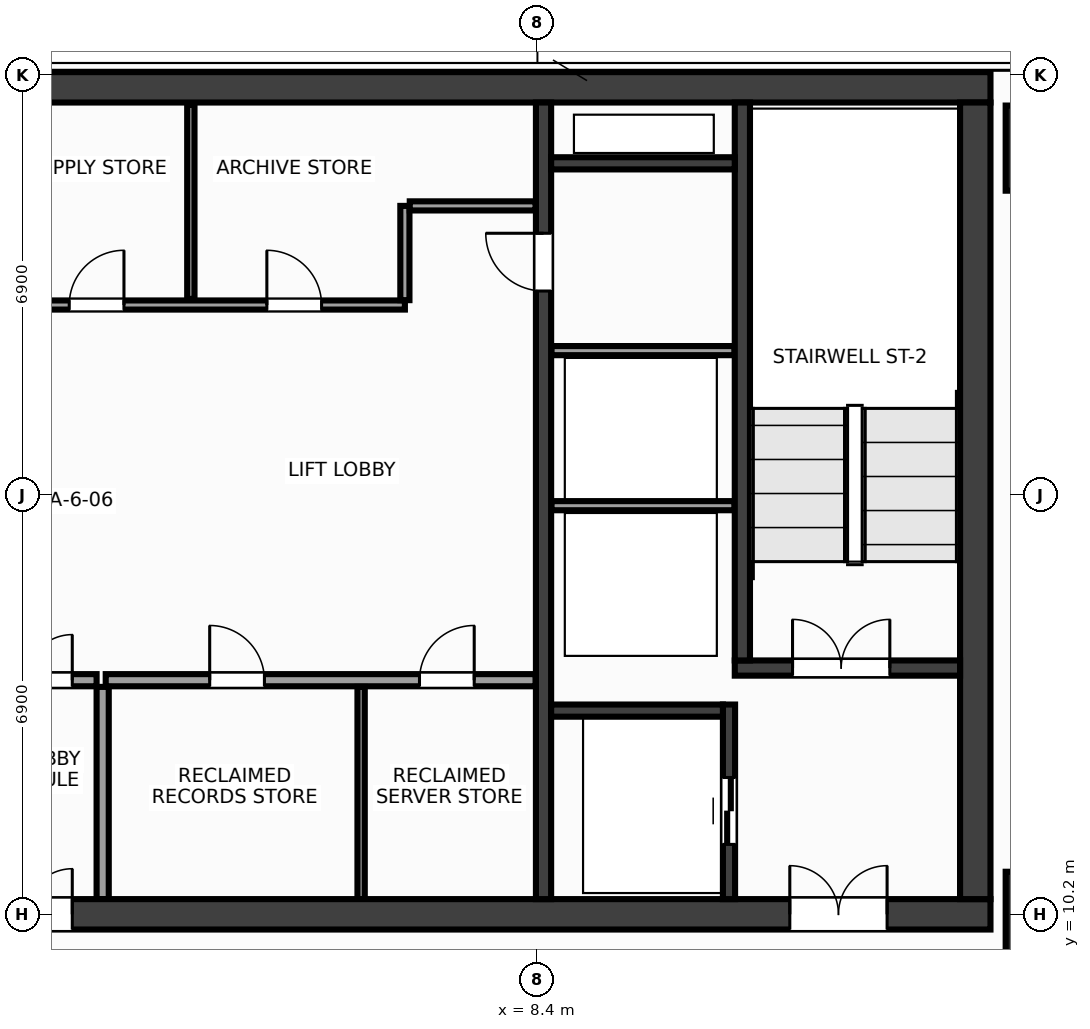
"""IFC4 building model, lengths in metres.
Left out: names, types, materials, properties, quantities, classifications, styles, units other than length and angle.
Written with IfcOpenShell. Run it as: python <this file> out.ifc"""

import sys

from ifc_helpers import new_model, si_unit, direction, frame, frame_2d, origin, origin_2d, place, context, subcontext, project, spatial, rectangle, extrude, source, transform, mapped, element, fill, save


model = new_model("IFC4")
c1 = context("Model", 3, precision=1e-05, world=origin(), true_north=direction((0.0, 1.0)))
c2 = subcontext(c1, "Body", "Model", "MODEL_VIEW")
j1 = project(units=[si_unit("LENGTHUNIT", "METRE"), si_unit("PLANEANGLEUNIT", "RADIAN")], contexts=[c1])
p1 = place(None, origin())
s1 = spatial("IfcSite", under=j1, at=p1, CompositionType="ELEMENT")
p2 = place(p1, origin())
s2 = spatial("IfcBuilding", under=s1, at=p2, CompositionType="ELEMENT")
p3 = place(p2, frame((0.0, 0.0, 257.6)))
s3 = spatial("IfcBuildingStorey", under=s2, at=p3, CompositionType="ELEMENT", Elevation=257.6)
m1 = source(origin(), c2, "Body", "SweptSolid", [
    extrude(rectangle(XDim=31.7, YDim=0.5, at=frame_2d((15.85, 0.0))), origin(), (0.0, 0.0, 1.0), 3.6),
])
p4 = place(p3, frame((-15.85, 23.8, 0.0), z_axis=(0.0, 0.0, 1.0), x_axis=(1.0, 0.0, 0.0)))
e1 = element("IfcWall", 1, at=p4, inside=s3, PredefinedType="SHEAR", context=c2, shape_type="MappedRepresentation", body=[
    mapped(m1, transform((0.0, 0.0, 0.0), x_axis=(1.0, 0.0, 0.0), y_axis=(0.0, 1.0, 0.0), z_axis=(0.0, 0.0, 1.0), scale=1.0)),
])
p5 = place(p3, frame((-15.85, 10.2, 0.0), z_axis=(0.0, 0.0, 1.0), x_axis=(1.0, 0.0, 0.0)))
e2 = element("IfcWall", 2, at=p5, inside=s3, PredefinedType="SHEAR", context=c2, shape_type="MappedRepresentation", body=[
    mapped(m1, transform((0.0, 0.0, 0.0), x_axis=(1.0, 0.0, 0.0), y_axis=(0.0, 1.0, 0.0), z_axis=(0.0, 0.0, 1.0), scale=1.0)),
])
p6 = place(p5, frame((1.7, 0.0, 0.0)))
e3 = element("IfcOpeningElement", 3, at=p6, cuts=e2, PredefinedType="OPENING", context=c2, shape_type="SweptSolid", body=[
    extrude(rectangle(XDim=1.6, YDim=2.15, at=frame_2d((0.8, 1.075))), frame((0.0, 0.262, 0.0), z_axis=(0.0, -1.0, 0.0), x_axis=(1.0, 0.0, 0.0)), (0.0, 0.0, 1.0), 0.524),
])
p7 = place(p5, frame((28.4, 0.0, 0.0)))
e4 = element("IfcOpeningElement", 4, at=p7, cuts=e2, PredefinedType="OPENING", context=c2, shape_type="SweptSolid", body=[
    extrude(rectangle(XDim=1.6, YDim=2.15, at=frame_2d((0.8, 1.075))), frame((0.0, 0.262, 0.0), z_axis=(0.0, -1.0, 0.0), x_axis=(1.0, 0.0, 0.0)), (0.0, 0.0, 1.0), 0.524),
])
p8 = place(p5, frame((15.1, 0.0, 0.0)))
e5 = element("IfcOpeningElement", 5, at=p8, cuts=e2, PredefinedType="OPENING", context=c2, shape_type="SweptSolid", body=[
    extrude(rectangle(XDim=1.5, YDim=2.2, at=frame_2d((0.75, 1.1))), frame((0.0, 0.262, 0.0), z_axis=(0.0, -1.0, 0.0), x_axis=(1.0, 0.0, 0.0)), (0.0, 0.0, 1.0), 0.524),
])
m2 = source(origin(), c2, "Body", "SweptSolid", [
    extrude(rectangle(XDim=13.1, YDim=0.5, at=frame_2d((6.55, 0.0))), origin(), (0.0, 0.0, 1.0), 3.6),
])
p9 = place(p3, frame((15.6, 10.45, 0.0), z_axis=(0.0, 0.0, 1.0), x_axis=(0.0, 1.0, 0.0)))
e6 = element("IfcWall", 6, at=p9, inside=s3, PredefinedType="SHEAR", context=c2, shape_type="MappedRepresentation", body=[
    mapped(m2, transform((0.0, 0.0, 0.0), x_axis=(1.0, 0.0, 0.0), y_axis=(0.0, 1.0, 0.0), z_axis=(0.0, 0.0, 1.0), scale=1.0)),
])
m3 = source(origin(), c2, "Body", "SweptSolid", [
    extrude(rectangle(XDim=13.1, YDim=0.25, at=frame_2d((6.55, 0.0))), origin(), (0.0, 0.0, 1.0), 3.6),
])
p10 = place(p3, frame((8.5, 10.45, 0.0), z_axis=(0.0, 0.0, 1.0), x_axis=(0.0, 1.0, 0.0)))
e7 = element("IfcWall", 7, at=p10, inside=s3, PredefinedType="SHEAR", context=c2, shape_type="MappedRepresentation", body=[
    mapped(m3, transform((0.0, 0.0, 0.0), x_axis=(1.0, 0.0, 0.0), y_axis=(0.0, 1.0, 0.0), z_axis=(0.0, 0.0, 1.0), scale=1.0)),
])
p11 = place(p10, frame((10.0, 0.0, 0.0)))
e8 = element("IfcOpeningElement", 8, at=p11, cuts=e7, PredefinedType="OPENING", context=c2, shape_type="SweptSolid", body=[
    extrude(rectangle(XDim=0.95, YDim=2.15, at=frame_2d((0.475, 1.075))), frame((0.0, 0.137, 0.0), z_axis=(0.0, -1.0, 0.0), x_axis=(1.0, 0.0, 0.0)), (0.0, 0.0, 1.0), 0.274),
])
m4 = source(origin(), c2, "Body", "SweptSolid", [
    extrude(rectangle(XDim=3.705, YDim=0.25, at=frame_2d((1.853, 0.0))), origin(), (0.0, 0.0, 1.0), 3.6),
])
p12 = place(p3, frame((11.645, 14.25, 0.0), z_axis=(0.0, 0.0, 1.0), x_axis=(1.0, 0.0, 0.0)))
e9 = element("IfcWall", 9, at=p12, inside=s3, PredefinedType="SHEAR", context=c2, shape_type="MappedRepresentation", body=[
    mapped(m4, transform((0.0, 0.0, 0.0), x_axis=(1.0, 0.0, 0.0), y_axis=(0.0, 1.0, 0.0), z_axis=(0.0, 0.0, 1.0), scale=1.0)),
])
p13 = place(p12, frame((0.95, 0.0, 0.0)))
e10 = element("IfcOpeningElement", 10, at=p13, cuts=e9, PredefinedType="OPENING", context=c2, shape_type="SweptSolid", body=[
    extrude(rectangle(XDim=1.6, YDim=2.15, at=frame_2d((0.8, 1.075))), frame((0.0, 0.137, 0.0), z_axis=(0.0, -1.0, 0.0), x_axis=(1.0, 0.0, 0.0)), (0.0, 0.0, 1.0), 0.274),
])
m5 = source(origin(), c2, "Body", "SweptSolid", [
    extrude(rectangle(XDim=9.175, YDim=0.25, at=frame_2d((4.587, 0.0))), origin(), (0.0, 0.0, 1.0), 3.6),
])
p14 = place(p3, frame((11.77, 14.375, 0.0), z_axis=(0.0, 0.0, 1.0), x_axis=(0.0, 1.0, 0.0)))
e11 = element("IfcWall", 11, at=p14, inside=s3, PredefinedType="SHEAR", context=c2, shape_type="MappedRepresentation", body=[
    mapped(m5, transform((0.0, 0.0, 0.0), x_axis=(1.0, 0.0, 0.0), y_axis=(0.0, 1.0, 0.0), z_axis=(0.0, 0.0, 1.0), scale=1.0)),
])
m6 = source(origin(), c2, "Body", "SweptSolid", [
    extrude(rectangle(XDim=3.2, YDim=0.2, at=frame_2d((1.6, 0.0))), origin(), (0.0, 0.0, 1.0), 3.6),
])
p15 = place(p3, frame((11.55, 10.45, 0.0), z_axis=(0.0, 0.0, 1.0), x_axis=(0.0, 1.0, 0.0)))
e12 = element("IfcWall", 12, at=p15, inside=s3, PredefinedType="SHEAR", context=c2, shape_type="MappedRepresentation", body=[
    mapped(m6, transform((0.0, 0.0, 0.0), x_axis=(1.0, 0.0, 0.0), y_axis=(0.0, 1.0, 0.0), z_axis=(0.0, 0.0, 1.0), scale=1.0)),
])
p16 = place(p15, frame((0.9, 0.0, 0.0)))
e13 = element("IfcOpeningElement", 13, at=p16, cuts=e12, PredefinedType="OPENING", context=c2, shape_type="SweptSolid", body=[
    extrude(rectangle(XDim=1.1, YDim=2.15, at=frame_2d((0.55, 1.075))), frame((0.0, 0.112, 0.0), z_axis=(0.0, -1.0, 0.0), x_axis=(1.0, 0.0, 0.0)), (0.0, 0.0, 1.0), 0.224),
])
m7 = source(origin(), c2, "Body", "SweptSolid", [
    extrude(rectangle(XDim=2.825, YDim=0.2, at=frame_2d((1.413, 0.0))), origin(), (0.0, 0.0, 1.0), 3.6),
])
p17 = place(p3, frame((8.625, 13.55, 0.0), z_axis=(0.0, 0.0, 1.0), x_axis=(1.0, 0.0, 0.0)))
e14 = element("IfcWall", 14, at=p17, inside=s3, PredefinedType="SHEAR", context=c2, shape_type="MappedRepresentation", body=[
    mapped(m7, transform((0.0, 0.0, 0.0), x_axis=(1.0, 0.0, 0.0), y_axis=(0.0, 1.0, 0.0), z_axis=(0.0, 0.0, 1.0), scale=1.0)),
])
m8 = source(origin(), c2, "Body", "SweptSolid", [
    extrude(rectangle(XDim=3.02, YDim=0.2, at=frame_2d((1.51, 0.0))), origin(), (0.0, 0.0, 1.0), 3.6),
])
p18 = place(p3, frame((8.625, 22.55, 0.0), z_axis=(0.0, 0.0, 1.0), x_axis=(1.0, 0.0, 0.0)))
e15 = element("IfcWall", 15, at=p18, inside=s3, PredefinedType="SHEAR", context=c2, shape_type="MappedRepresentation", body=[
    mapped(m8, transform((0.0, 0.0, 0.0), x_axis=(1.0, 0.0, 0.0), y_axis=(0.0, 1.0, 0.0), z_axis=(0.0, 0.0, 1.0), scale=1.0)),
])
m9 = source(origin(), c2, "Body", "SweptSolid", [
    extrude(rectangle(XDim=1.4, YDim=1.4, at=origin_2d()), origin(), (0.0, 0.0, 1.0), 3.6),
])
for number, where, z_axis, x_axis in (
    (16, (16.8, 10.2, 0.0), (0.0, 0.0, 1.0), (1.0, 0.0, 0.0)),
    (17, (16.8, 22.8, 0.0), (0.0, 0.0, 1.0), (1.0, 0.0, 0.0)),
):
    element("IfcColumn", number, at=place(p3, frame(where, z_axis=z_axis, x_axis=x_axis)), inside=s3, PredefinedType="COLUMN", context=c2, shape_type="MappedRepresentation", body=[
        mapped(m9, transform((0.0, 0.0, 0.0), x_axis=(1.0, 0.0, 0.0), y_axis=(0.0, 1.0, 0.0), z_axis=(0.0, 0.0, 1.0), scale=1.0)),
    ])
m10 = source(origin(), c2, "Body", "SweptSolid", [
    extrude(rectangle(XDim=3.01, YDim=0.15, at=frame_2d((1.505, 0.0))), origin(), (0.0, 0.0, 1.0), 3.37),
])
for number, where, z_axis, x_axis in (
    (18, (8.63, 16.92, 0.0), (0.0, 0.0, 1.0), (1.0, 0.0, 0.0)),
    (19, (8.63, 19.47, 0.0), (0.0, 0.0, 1.0), (1.0, 0.0, 0.0)),
):
    element("IfcWall", number, at=place(p3, frame(where, z_axis=z_axis, x_axis=x_axis)), inside=s3, PredefinedType="PARTITIONING", context=c2, shape_type="MappedRepresentation", body=[
        mapped(m10, transform((0.0, 0.0, 0.0), x_axis=(1.0, 0.0, 0.0), y_axis=(0.0, 1.0, 0.0), z_axis=(0.0, 0.0, 1.0), scale=1.0)),
    ])
m11 = source(origin(), c2, "Body", "SweptSolid", [
    extrude(rectangle(XDim=7.07, YDim=0.2, at=frame_2d((3.535, 0.0))), origin(), (0.0, 0.0, 1.0), 3.37),
])
p19 = place(p3, frame((1.3, 14.05, 0.0), z_axis=(0.0, 0.0, 1.0), x_axis=(1.0, 0.0, 0.0)))
e20 = element("IfcWall", 20, at=p19, inside=s3, PredefinedType="PARTITIONING", context=c2, shape_type="MappedRepresentation", body=[
    mapped(m11, transform((0.0, 0.0, 0.0), x_axis=(1.0, 0.0, 0.0), y_axis=(0.0, 1.0, 0.0), z_axis=(0.0, 0.0, 1.0), scale=1.0)),
])
p20 = place(p19, frame((1.71, 0.0, 0.0)))
e21 = element("IfcOpeningElement", 21, at=p20, cuts=e20, PredefinedType="OPENING", context=c2, shape_type="SweptSolid", body=[
    extrude(rectangle(XDim=0.9, YDim=2.15, at=frame_2d((0.45, 1.075))), frame((0.0, 0.112, 0.0), z_axis=(0.0, -1.0, 0.0), x_axis=(1.0, 0.0, 0.0)), (0.0, 0.0, 1.0), 0.224),
])
p21 = place(p19, frame((5.16, 0.0, 0.0)))
e22 = element("IfcOpeningElement", 22, at=p21, cuts=e20, PredefinedType="OPENING", context=c2, shape_type="SweptSolid", body=[
    extrude(rectangle(XDim=0.9, YDim=2.15, at=frame_2d((0.45, 1.075))), frame((0.0, 0.112, 0.0), z_axis=(0.0, -1.0, 0.0), x_axis=(1.0, 0.0, 0.0)), (0.0, 0.0, 1.0), 0.224),
])
m12 = source(origin(), c2, "Body", "SweptSolid", [
    extrude(rectangle(XDim=3.49, YDim=0.2, at=frame_2d((1.745, 0.0))), origin(), (0.0, 0.0, 1.0), 3.37),
])
p22 = place(p3, frame((1.25, 10.45, 0.0), z_axis=(0.0, 0.0, 1.0), x_axis=(0.0, 1.0, 0.0)))
e23 = element("IfcWall", 23, at=p22, inside=s3, PredefinedType="PARTITIONING", context=c2, shape_type="MappedRepresentation", body=[
    mapped(m12, transform((0.0, 0.0, 0.0), x_axis=(1.0, 0.0, 0.0), y_axis=(0.0, 1.0, 0.0), z_axis=(0.0, 0.0, 1.0), scale=1.0)),
])
m13 = source(origin(), c2, "Body", "SweptSolid", [
    extrude(rectangle(XDim=2.3, YDim=0.2, at=frame_2d((1.15, 0.0))), origin(), (0.0, 0.0, 1.0), 3.37),
])
p23 = place(p3, frame((-1.15, 14.05, 0.0), z_axis=(0.0, 0.0, 1.0), x_axis=(1.0, 0.0, 0.0)))
e24 = element("IfcWall", 24, at=p23, inside=s3, PredefinedType="PARTITIONING", context=c2, shape_type="MappedRepresentation", body=[
    mapped(m13, transform((0.0, 0.0, 0.0), x_axis=(1.0, 0.0, 0.0), y_axis=(0.0, 1.0, 0.0), z_axis=(0.0, 0.0, 1.0), scale=1.0)),
])
p24 = place(p23, frame((0.4, 0.0, 0.0)))
e25 = element("IfcOpeningElement", 25, at=p24, cuts=e24, PredefinedType="OPENING", context=c2, shape_type="SweptSolid", body=[
    extrude(rectangle(XDim=1.5, YDim=2.2, at=frame_2d((0.75, 1.1))), frame((0.0, 0.112, 0.0), z_axis=(0.0, -1.0, 0.0), x_axis=(1.0, 0.0, 0.0)), (0.0, 0.0, 1.0), 0.224),
])
m14 = source(origin(), c2, "Body", "SweptSolid", [
    extrude(rectangle(XDim=14.59, YDim=0.15, at=frame_2d((7.295, 0.0))), origin(), (0.0, 0.0, 1.0), 3.37),
])
p25 = place(p3, frame((-8.37, 20.22, 0.0), z_axis=(0.0, 0.0, 1.0), x_axis=(1.0, 0.0, 0.0)))
e26 = element("IfcWall", 26, at=p25, inside=s3, PredefinedType="PARTITIONING", context=c2, shape_type="MappedRepresentation", body=[
    mapped(m14, transform((0.0, 0.0, 0.0), x_axis=(1.0, 0.0, 0.0), y_axis=(0.0, 1.0, 0.0), z_axis=(0.0, 0.0, 1.0), scale=1.0)),
])
p26 = place(p25, frame((0.86, 0.0, 0.0)))
e27 = element("IfcOpeningElement", 27, at=p26, cuts=e26, PredefinedType="OPENING", context=c2, shape_type="SweptSolid", body=[
    extrude(rectangle(XDim=0.9, YDim=2.15, at=frame_2d((0.45, 1.075))), frame((0.0, 0.087, 0.0), z_axis=(0.0, -1.0, 0.0), x_axis=(1.0, 0.0, 0.0)), (0.0, 0.0, 1.0), 0.174),
])
p27 = place(p25, frame((3.47, 0.0, 0.0)))
e28 = element("IfcOpeningElement", 28, at=p27, cuts=e26, PredefinedType="OPENING", context=c2, shape_type="SweptSolid", body=[
    extrude(rectangle(XDim=0.9, YDim=2.15, at=frame_2d((0.45, 1.075))), frame((0.0, 0.087, 0.0), z_axis=(0.0, -1.0, 0.0), x_axis=(1.0, 0.0, 0.0)), (0.0, 0.0, 1.0), 0.174),
])
p28 = place(p25, frame((6.17, 0.0, 0.0)))
e29 = element("IfcOpeningElement", 29, at=p28, cuts=e26, PredefinedType="OPENING", context=c2, shape_type="SweptSolid", body=[
    extrude(rectangle(XDim=0.9, YDim=2.15, at=frame_2d((0.45, 1.075))), frame((0.0, 0.087, 0.0), z_axis=(0.0, -1.0, 0.0), x_axis=(1.0, 0.0, 0.0)), (0.0, 0.0, 1.0), 0.174),
])
p29 = place(p25, frame((9.07, 0.0, 0.0)))
e30 = element("IfcOpeningElement", 30, at=p29, cuts=e26, PredefinedType="OPENING", context=c2, shape_type="SweptSolid", body=[
    extrude(rectangle(XDim=0.9, YDim=2.15, at=frame_2d((0.45, 1.075))), frame((0.0, 0.087, 0.0), z_axis=(0.0, -1.0, 0.0), x_axis=(1.0, 0.0, 0.0)), (0.0, 0.0, 1.0), 0.174),
])
p30 = place(p25, frame((12.32, 0.0, 0.0)))
e31 = element("IfcOpeningElement", 31, at=p30, cuts=e26, PredefinedType="OPENING", context=c2, shape_type="SweptSolid", body=[
    extrude(rectangle(XDim=0.9, YDim=2.15, at=frame_2d((0.45, 1.075))), frame((0.0, 0.087, 0.0), z_axis=(0.0, -1.0, 0.0), x_axis=(1.0, 0.0, 0.0)), (0.0, 0.0, 1.0), 0.174),
])
m15 = source(origin(), c2, "Body", "SweptSolid", [
    extrude(rectangle(XDim=1.55, YDim=0.15, at=frame_2d((0.775, 0.0))), origin(), (0.0, 0.0, 1.0), 3.37),
])
p31 = place(p3, frame((6.22, 20.3, 0.0), z_axis=(0.0, 0.0, 1.0), x_axis=(0.0, 1.0, 0.0)))
e32 = element("IfcWall", 32, at=p31, inside=s3, PredefinedType="PARTITIONING", context=c2, shape_type="MappedRepresentation", body=[
    mapped(m15, transform((0.0, 0.0, 0.0), x_axis=(1.0, 0.0, 0.0), y_axis=(0.0, 1.0, 0.0), z_axis=(0.0, 0.0, 1.0), scale=1.0)),
])
m16 = source(origin(), c2, "Body", "SweptSolid", [
    extrude(rectangle(XDim=2.07, YDim=0.15, at=frame_2d((1.035, 0.0))), origin(), (0.0, 0.0, 1.0), 3.37),
])
p32 = place(p3, frame((6.3, 21.85, 0.0), z_axis=(0.0, 0.0, 1.0), x_axis=(1.0, 0.0, 0.0)))
e33 = element("IfcWall", 33, at=p32, inside=s3, PredefinedType="PARTITIONING", context=c2, shape_type="MappedRepresentation", body=[
    mapped(m16, transform((0.0, 0.0, 0.0), x_axis=(1.0, 0.0, 0.0), y_axis=(0.0, 1.0, 0.0), z_axis=(0.0, 0.0, 1.0), scale=1.0)),
])
m17 = source(origin(), c2, "Body", "SweptSolid", [
    extrude(rectangle(XDim=3.49, YDim=0.12, at=frame_2d((1.745, 0.0))), origin(), (0.0, 0.0, 1.0), 3.37),
])
p33 = place(p3, frame((5.5, 10.45, 0.0), z_axis=(0.0, 0.0, 1.0), x_axis=(0.0, 1.0, 0.0)))
e34 = element("IfcWall", 34, at=p33, inside=s3, PredefinedType="PARTITIONING", context=c2, shape_type="MappedRepresentation", body=[
    mapped(m17, transform((0.0, 0.0, 0.0), x_axis=(1.0, 0.0, 0.0), y_axis=(0.0, 1.0, 0.0), z_axis=(0.0, 0.0, 1.0), scale=1.0)),
])
m18 = source(origin(), c2, "Body", "SweptSolid", [
    extrude(rectangle(XDim=3.19, YDim=0.12, at=frame_2d((1.595, 0.0))), origin(), (0.0, 0.0, 1.0), 3.37),
])
p34 = place(p3, frame((2.7, 20.32, 0.0), z_axis=(0.0, 0.0, 1.0), x_axis=(0.0, 1.0, 0.0)))
e35 = element("IfcWall", 35, at=p34, inside=s3, PredefinedType="PARTITIONING", context=c2, shape_type="MappedRepresentation", body=[
    mapped(m18, transform((0.0, 0.0, 0.0), x_axis=(1.0, 0.0, 0.0), y_axis=(0.0, 1.0, 0.0), z_axis=(0.0, 0.0, 1.0), scale=1.0)),
])
m19 = source(origin(), c2, "Body", "SweptSolid", [
    extrude(rectangle(XDim=1.6, YDim=2.15, at=frame_2d((0.8, 1.075))), frame((0.0, 0.025, 0.0), z_axis=(0.0, -1.0, 0.0), x_axis=(1.0, 0.0, 0.0)), (0.0, 0.0, 1.0), 0.05),
])
p35 = place(p13, origin())
e36 = element("IfcDoor", 36, at=p35, inside=s3, OperationType="DOUBLE_DOOR_SINGLE_SWING", PredefinedType="DOOR", context=c2, shape_type="MappedRepresentation", body=[
    mapped(m19, transform((0.0, 0.0, 0.0), x_axis=(1.0, 0.0, 0.0), y_axis=(0.0, 1.0, 0.0), z_axis=(0.0, 0.0, 1.0), scale=1.0)),
])
fill(e10, e36)
p36 = place(p7, origin())
e37 = element("IfcDoor", 37, at=p36, inside=s3, OperationType="DOUBLE_DOOR_SINGLE_SWING", PredefinedType="DOOR", context=c2, shape_type="MappedRepresentation", body=[
    mapped(m19, transform((0.0, 0.0, 0.0), x_axis=(1.0, 0.0, 0.0), y_axis=(0.0, 1.0, 0.0), z_axis=(0.0, 0.0, 1.0), scale=1.0)),
])
fill(e4, e37)
m20 = source(origin(), c2, "Body", "SweptSolid", [
    extrude(rectangle(XDim=1.1, YDim=2.15, at=frame_2d((0.55, 1.075))), frame((0.0, 0.025, 0.0), z_axis=(0.0, -1.0, 0.0), x_axis=(1.0, 0.0, 0.0)), (0.0, 0.0, 1.0), 0.05),
])
p37 = place(p16, origin())
e38 = element("IfcDoor", 38, at=p37, inside=s3, OperationType="DOUBLE_DOOR_SLIDING", PredefinedType="DOOR", context=c2, shape_type="MappedRepresentation", body=[
    mapped(m20, transform((0.0, 0.0, 0.0), x_axis=(1.0, 0.0, 0.0), y_axis=(0.0, 1.0, 0.0), z_axis=(0.0, 0.0, 1.0), scale=1.0)),
])
fill(e13, e38)
m21 = source(origin(), c2, "Body", "SweptSolid", [
    extrude(rectangle(XDim=0.95, YDim=2.15, at=frame_2d((0.475, 1.075))), frame((0.0, 0.025, 0.0), z_axis=(0.0, -1.0, 0.0), x_axis=(1.0, 0.0, 0.0)), (0.0, 0.0, 1.0), 0.05),
])
p38 = place(p11, origin())
e39 = element("IfcDoor", 39, at=p38, inside=s3, OperationType="SINGLE_SWING_RIGHT", PredefinedType="DOOR", context=c2, shape_type="MappedRepresentation", body=[
    mapped(m21, transform((0.0, 0.0, 0.0), x_axis=(1.0, 0.0, 0.0), y_axis=(0.0, 1.0, 0.0), z_axis=(0.0, 0.0, 1.0), scale=1.0)),
])
fill(e8, e39)
m22 = source(origin(), c2, "Body", "SweptSolid", [
    extrude(rectangle(XDim=0.9, YDim=2.15, at=frame_2d((0.45, 1.075))), frame((0.0, 0.025, 0.0), z_axis=(0.0, -1.0, 0.0), x_axis=(1.0, 0.0, 0.0)), (0.0, 0.0, 1.0), 0.05),
])
p39 = place(p20, origin())
e40 = element("IfcDoor", 40, at=p39, inside=s3, OperationType="SINGLE_SWING_LEFT", PredefinedType="DOOR", context=c2, shape_type="MappedRepresentation", body=[
    mapped(m22, transform((0.0, 0.0, 0.0), x_axis=(1.0, 0.0, 0.0), y_axis=(0.0, 1.0, 0.0), z_axis=(0.0, 0.0, 1.0), scale=1.0)),
])
fill(e21, e40)
p40 = place(p21, origin())
e41 = element("IfcDoor", 41, at=p40, inside=s3, OperationType="SINGLE_SWING_RIGHT", PredefinedType="DOOR", context=c2, shape_type="MappedRepresentation", body=[
    mapped(m22, transform((0.0, 0.0, 0.0), x_axis=(1.0, 0.0, 0.0), y_axis=(0.0, 1.0, 0.0), z_axis=(0.0, 0.0, 1.0), scale=1.0)),
])
fill(e22, e41)
m23 = source(origin(), c2, "Body", "SweptSolid", [
    extrude(rectangle(XDim=1.5, YDim=2.2, at=frame_2d((0.75, 1.1))), frame((0.0, 0.025, 0.0), z_axis=(0.0, -1.0, 0.0), x_axis=(1.0, 0.0, 0.0)), (0.0, 0.0, 1.0), 0.05),
])
p41 = place(p24, origin())
e42 = element("IfcDoor", 42, at=p41, inside=s3, OperationType="DOUBLE_DOOR_SINGLE_SWING", PredefinedType="DOOR", context=c2, shape_type="MappedRepresentation", body=[
    mapped(m23, transform((0.0, 0.0, 0.0), x_axis=(1.0, 0.0, 0.0), y_axis=(0.0, 1.0, 0.0), z_axis=(0.0, 0.0, 1.0), scale=1.0)),
])
fill(e25, e42)
p42 = place(p8, origin())
e43 = element("IfcDoor", 43, at=p42, inside=s3, OperationType="DOUBLE_DOOR_SINGLE_SWING", PredefinedType="DOOR", context=c2, shape_type="MappedRepresentation", body=[
    mapped(m23, transform((0.0, 0.0, 0.0), x_axis=(1.0, 0.0, 0.0), y_axis=(0.0, 1.0, 0.0), z_axis=(0.0, 0.0, 1.0), scale=1.0)),
])
fill(e5, e43)
p43 = place(p29, origin())
e44 = element("IfcDoor", 44, at=p43, inside=s3, OperationType="SINGLE_SWING_RIGHT", PredefinedType="DOOR", context=c2, shape_type="MappedRepresentation", body=[
    mapped(m22, transform((0.0, 0.0, 0.0), x_axis=(1.0, 0.0, 0.0), y_axis=(0.0, 1.0, 0.0), z_axis=(0.0, 0.0, 1.0), scale=1.0)),
])
fill(e30, e44)
p44 = place(p30, origin())
e45 = element("IfcDoor", 45, at=p44, inside=s3, OperationType="SINGLE_SWING_LEFT", PredefinedType="DOOR", context=c2, shape_type="MappedRepresentation", body=[
    mapped(m22, transform((0.0, 0.0, 0.0), x_axis=(1.0, 0.0, 0.0), y_axis=(0.0, 1.0, 0.0), z_axis=(0.0, 0.0, 1.0), scale=1.0)),
])
fill(e31, e45)
save(model, sys.argv[1])
